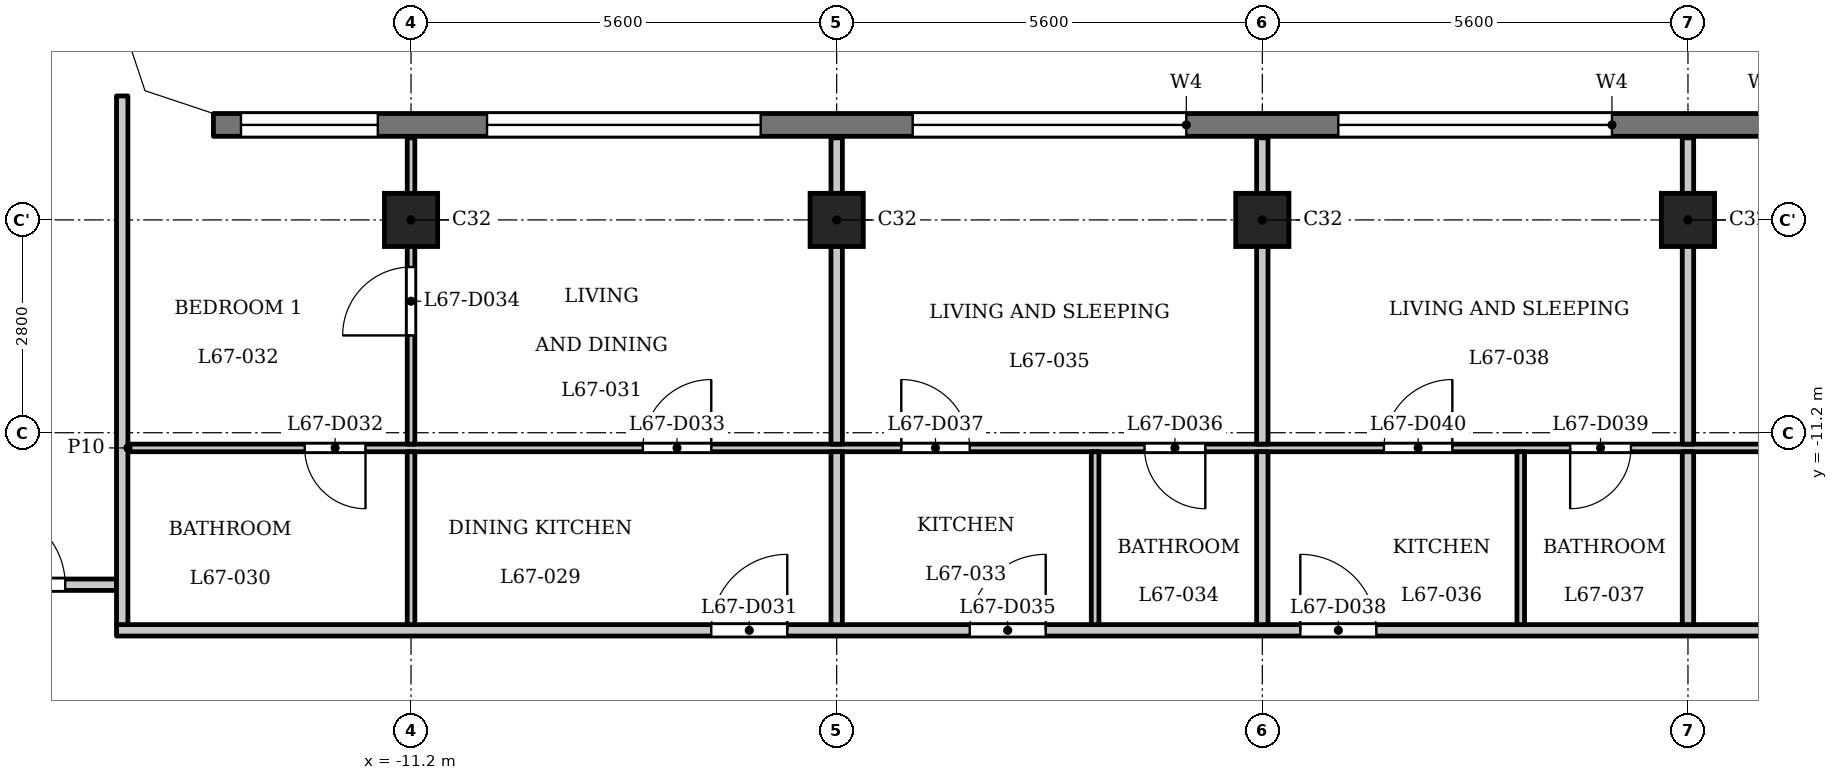
"""IFC4 building model, lengths in metres.
Left out: names, types, materials, properties, quantities, classifications, styles, units other than length and angle.
Written with IfcOpenShell. Run it as: python <this file> out.ifc"""

import sys

from ifc_helpers import new_model, si_unit, direction, frame, frame_2d, origin, origin_2d, place, context, subcontext, project, spatial, polyline, rectangle, outline, extrude, element, fill, save


model = new_model("IFC4")
c1 = context("Model", 3, precision=1e-05, world=origin(), true_north=direction((0.0, 1.0)))
c2 = subcontext(c1, "Body", "Model", "MODEL_VIEW")
j1 = project(units=[si_unit("LENGTHUNIT", "METRE"), si_unit("PLANEANGLEUNIT", "RADIAN")], contexts=[c1])
p1 = place(None, origin())
s1 = spatial("IfcSite", under=j1, at=p1, CompositionType="ELEMENT")
p2 = place(p1, origin())
s2 = spatial("IfcBuilding", under=s1, at=p2, CompositionType="ELEMENT")
p3 = place(p2, frame((0.0, 0.0, 259.2)))
s3 = spatial("IfcBuildingStorey", under=s2, at=p3, CompositionType="ELEMENT", Elevation=259.2)
for number, where, z_axis, x_axis in (
    (1, (-11.2, -8.4, 0.0), (0.0, 0.0, 1.0), (1.0, 0.0, 0.0)),
    (2, (-5.6, -8.4, 0.0), (0.0, 0.0, 1.0), (1.0, 0.0, 0.0)),
    (3, (0.0, -8.4, 0.0), (0.0, 0.0, 1.0), (1.0, 0.0, 0.0)),
    (4, (5.6, -8.4, 0.0), (0.0, 0.0, 1.0), (1.0, 0.0, 0.0)),
):
    element("IfcColumn", number, at=place(p3, frame(where, z_axis=z_axis, x_axis=x_axis)), inside=s3, PredefinedType="COLUMN", context=c2, shape_type="SweptSolid", body=[
        extrude(rectangle(XDim=0.7, YDim=0.7, at=origin_2d()), origin(), (0.0, 0.0, 1.0), 3.5),
    ])
p4 = place(p3, frame((13.8, -7.15, 0.0), z_axis=(0.0, 0.0, 1.0), x_axis=(-1.0, 0.0, 0.0)))
e5 = element("IfcWall", 5, at=p4, inside=s3, PredefinedType="SOLIDWALL", context=c2, shape_type="SweptSolid", body=[
    extrude(rectangle(XDim=27.6, YDim=0.3, at=frame_2d((13.8, 0.0))), origin(), (0.0, 0.0, 1.0), 3.2),
])
p5 = place(p4, frame((0.363, 0.0, 0.9)))
e6 = element("IfcOpeningElement", 6, at=p5, cuts=e5, PredefinedType="OPENING", context=c2, shape_type="SweptSolid", body=[
    extrude(rectangle(XDim=1.8, YDim=1.25, at=frame_2d((0.9, 0.625))), frame((0.0, 0.16, 0.0), z_axis=(0.0, -1.0, 0.0), x_axis=(1.0, 0.0, 0.0)), (0.0, 0.0, 1.0), 0.32),
])
p6 = place(p4, frame((3.6, 0.0, 1.2)))
e7 = element("IfcOpeningElement", 7, at=p6, cuts=e5, PredefinedType="OPENING", context=c2, shape_type="SweptSolid", body=[
    extrude(rectangle(XDim=3.6, YDim=0.95, at=frame_2d((1.8, 0.475))), frame((0.0, 0.16, 0.0), z_axis=(0.0, -1.0, 0.0), x_axis=(1.0, 0.0, 0.0)), (0.0, 0.0, 1.0), 0.32),
])
p7 = place(p4, frame((9.2, 0.0, 1.2)))
e8 = element("IfcOpeningElement", 8, at=p7, cuts=e5, PredefinedType="OPENING", context=c2, shape_type="SweptSolid", body=[
    extrude(rectangle(XDim=3.6, YDim=0.95, at=frame_2d((1.8, 0.475))), frame((0.0, 0.16, 0.0), z_axis=(0.0, -1.0, 0.0), x_axis=(1.0, 0.0, 0.0)), (0.0, 0.0, 1.0), 0.32),
])
p8 = place(p4, frame((14.8, 0.0, 1.2)))
e9 = element("IfcOpeningElement", 9, at=p8, cuts=e5, PredefinedType="OPENING", context=c2, shape_type="SweptSolid", body=[
    extrude(rectangle(XDim=3.6, YDim=0.95, at=frame_2d((1.8, 0.475))), frame((0.0, 0.16, 0.0), z_axis=(0.0, -1.0, 0.0), x_axis=(1.0, 0.0, 0.0)), (0.0, 0.0, 1.0), 0.32),
])
p9 = place(p4, frame((20.4, 0.0, 1.2)))
e10 = element("IfcOpeningElement", 10, at=p9, cuts=e5, PredefinedType="OPENING", context=c2, shape_type="SweptSolid", body=[
    extrude(rectangle(XDim=3.6, YDim=0.95, at=frame_2d((1.8, 0.475))), frame((0.0, 0.16, 0.0), z_axis=(0.0, -1.0, 0.0), x_axis=(1.0, 0.0, 0.0)), (0.0, 0.0, 1.0), 0.32),
])
p10 = place(p4, frame((25.438, 0.0, 0.9)))
e11 = element("IfcOpeningElement", 11, at=p10, cuts=e5, PredefinedType="OPENING", context=c2, shape_type="SweptSolid", body=[
    extrude(rectangle(XDim=1.8, YDim=1.25, at=frame_2d((0.9, 0.625))), frame((0.0, 0.16, 0.0), z_axis=(0.0, -1.0, 0.0), x_axis=(1.0, 0.0, 0.0)), (0.0, 0.0, 1.0), 0.32),
])
p11 = place(p3, frame((-15.075, -13.8, 0.0), z_axis=(0.0, 0.0, 1.0), x_axis=(1.0, 0.0, 0.0)))
e12 = element("IfcWall", 12, at=p11, inside=s3, PredefinedType="PARTITIONING", context=c2, shape_type="SweptSolid", body=[
    extrude(rectangle(XDim=30.15, YDim=0.15, at=frame_2d((15.075, 0.0))), origin(), (0.0, 0.0, 1.0), 3.2),
])
p12 = place(p11, frame((7.825, 0.0, 0.0)))
e13 = element("IfcOpeningElement", 13, at=p12, cuts=e12, PredefinedType="OPENING", context=c2, shape_type="SweptSolid", body=[
    extrude(rectangle(XDim=1.0, YDim=2.1, at=frame_2d((0.5, 1.05))), frame((0.0, 0.085, 0.0), z_axis=(0.0, -1.0, 0.0), x_axis=(1.0, 0.0, 0.0)), (0.0, 0.0, 1.0), 0.17),
])
p13 = place(p11, frame((11.225, 0.0, 0.0)))
e14 = element("IfcOpeningElement", 14, at=p13, cuts=e12, PredefinedType="OPENING", context=c2, shape_type="SweptSolid", body=[
    extrude(rectangle(XDim=1.0, YDim=2.1, at=frame_2d((0.5, 1.05))), frame((0.0, 0.085, 0.0), z_axis=(0.0, -1.0, 0.0), x_axis=(1.0, 0.0, 0.0)), (0.0, 0.0, 1.0), 0.17),
])
p14 = place(p11, frame((15.575, 0.0, 0.0)))
e15 = element("IfcOpeningElement", 15, at=p14, cuts=e12, PredefinedType="OPENING", context=c2, shape_type="SweptSolid", body=[
    extrude(rectangle(XDim=1.0, YDim=2.1, at=frame_2d((0.5, 1.05))), frame((0.0, 0.085, 0.0), z_axis=(0.0, -1.0, 0.0), x_axis=(1.0, 0.0, 0.0)), (0.0, 0.0, 1.0), 0.17),
])
p15 = place(p11, frame((28.424, 0.0, 0.0)))
e16 = element("IfcOpeningElement", 16, at=p15, cuts=e12, PredefinedType="OPENING", context=c2, shape_type="SweptSolid", body=[
    extrude(rectangle(XDim=1.0, YDim=2.1, at=frame_2d((0.5, 1.05))), frame((0.0, 0.085, 0.0), z_axis=(0.0, -1.0, 0.0), x_axis=(1.0, 0.0, 0.0)), (0.0, 0.0, 1.0), 0.17),
])
p16 = place(p3, frame((-17.4, -13.2, 0.0), z_axis=(0.0, 0.0, 1.0), x_axis=(1.0, 0.0, 0.0)))
e17 = element("IfcWall", 17, at=p16, inside=s3, PredefinedType="PARTITIONING", context=c2, shape_type="SweptSolid", body=[
    extrude(rectangle(XDim=2.325, YDim=0.15, at=frame_2d((1.163, 0.0))), origin(), (0.0, 0.0, 1.0), 3.2),
])
p17 = place(p16, frame((0.65, 0.0, 0.0)))
e18 = element("IfcOpeningElement", 18, at=p17, cuts=e17, PredefinedType="OPENING", context=c2, shape_type="SweptSolid", body=[
    extrude(rectangle(XDim=1.0, YDim=2.1, at=frame_2d((0.5, 1.05))), frame((0.0, 0.085, 0.0), z_axis=(0.0, -1.0, 0.0), x_axis=(1.0, 0.0, 0.0)), (0.0, 0.0, 1.0), 0.17),
])
p18 = place(p3, frame((-14.925, -11.4, 0.0), z_axis=(0.0, 0.0, 1.0), x_axis=(1.0, 0.0, 0.0)))
e19 = element("IfcWall", 19, at=p18, inside=s3, PredefinedType="PARTITIONING", context=c2, shape_type="SweptSolid", body=[
    extrude(rectangle(XDim=29.85, YDim=0.1, at=frame_2d((14.925, 0.0))), origin(), (0.0, 0.0, 1.0), 3.2),
])
p19 = place(p18, frame((2.326, 0.0, 0.0)))
e20 = element("IfcOpeningElement", 20, at=p19, cuts=e19, PredefinedType="OPENING", context=c2, shape_type="SweptSolid", body=[
    extrude(rectangle(XDim=0.8, YDim=2.1, at=frame_2d((0.4, 1.05))), frame((0.0, 0.06, 0.0), z_axis=(0.0, -1.0, 0.0), x_axis=(1.0, 0.0, 0.0)), (0.0, 0.0, 1.0), 0.12),
])
p20 = place(p18, frame((6.775, 0.0, 0.0)))
e21 = element("IfcOpeningElement", 21, at=p20, cuts=e19, PredefinedType="OPENING", context=c2, shape_type="SweptSolid", body=[
    extrude(rectangle(XDim=0.9, YDim=2.1, at=frame_2d((0.45, 1.05))), frame((0.0, 0.06, 0.0), z_axis=(0.0, -1.0, 0.0), x_axis=(1.0, 0.0, 0.0)), (0.0, 0.0, 1.0), 0.12),
])
p21 = place(p18, frame((13.375, 0.0, 0.0)))
e22 = element("IfcOpeningElement", 22, at=p21, cuts=e19, PredefinedType="OPENING", context=c2, shape_type="SweptSolid", body=[
    extrude(rectangle(XDim=0.8, YDim=2.1, at=frame_2d((0.4, 1.05))), frame((0.0, 0.06, 0.0), z_axis=(0.0, -1.0, 0.0), x_axis=(1.0, 0.0, 0.0)), (0.0, 0.0, 1.0), 0.12),
])
p22 = place(p18, frame((10.175, 0.0, 0.0)))
e23 = element("IfcOpeningElement", 23, at=p22, cuts=e19, PredefinedType="OPENING", context=c2, shape_type="SweptSolid", body=[
    extrude(rectangle(XDim=0.9, YDim=2.1, at=frame_2d((0.45, 1.05))), frame((0.0, 0.06, 0.0), z_axis=(0.0, -1.0, 0.0), x_axis=(1.0, 0.0, 0.0)), (0.0, 0.0, 1.0), 0.12),
])
p23 = place(p18, frame((18.975, 0.0, 0.0)))
e24 = element("IfcOpeningElement", 24, at=p23, cuts=e19, PredefinedType="OPENING", context=c2, shape_type="SweptSolid", body=[
    extrude(rectangle(XDim=0.8, YDim=2.1, at=frame_2d((0.4, 1.05))), frame((0.0, 0.06, 0.0), z_axis=(0.0, -1.0, 0.0), x_axis=(1.0, 0.0, 0.0)), (0.0, 0.0, 1.0), 0.12),
])
p24 = place(p18, frame((16.525, 0.0, 0.0)))
e25 = element("IfcOpeningElement", 25, at=p24, cuts=e19, PredefinedType="OPENING", context=c2, shape_type="SweptSolid", body=[
    extrude(rectangle(XDim=0.9, YDim=2.1, at=frame_2d((0.45, 1.05))), frame((0.0, 0.06, 0.0), z_axis=(0.0, -1.0, 0.0), x_axis=(1.0, 0.0, 0.0)), (0.0, 0.0, 1.0), 0.12),
])
p25 = place(p18, frame((24.675, 0.0, 0.0)))
e26 = element("IfcOpeningElement", 26, at=p25, cuts=e19, PredefinedType="OPENING", context=c2, shape_type="SweptSolid", body=[
    extrude(rectangle(XDim=0.8, YDim=2.1, at=frame_2d((0.4, 1.05))), frame((0.0, 0.06, 0.0), z_axis=(0.0, -1.0, 0.0), x_axis=(1.0, 0.0, 0.0)), (0.0, 0.0, 1.0), 0.12),
])
p26 = place(p18, frame((27.374, 0.0, 0.0)))
e27 = element("IfcOpeningElement", 27, at=p26, cuts=e19, PredefinedType="OPENING", context=c2, shape_type="SweptSolid", body=[
    extrude(rectangle(XDim=0.9, YDim=2.1, at=frame_2d((0.45, 1.05))), frame((0.0, 0.06, 0.0), z_axis=(0.0, -1.0, 0.0), x_axis=(1.0, 0.0, 0.0)), (0.0, 0.0, 1.0), 0.12),
])
p27 = place(p3, frame((-15.0, -13.725, 0.0), z_axis=(0.0, 0.0, 1.0), x_axis=(0.0, 1.0, 0.0)))
e28 = element("IfcWall", 28, at=p27, inside=s3, PredefinedType="PARTITIONING", context=c2, shape_type="SweptSolid", body=[
    extrude(rectangle(XDim=6.956, YDim=0.15, at=frame_2d((3.478, 0.0))), origin(), (0.0, 0.0, 1.0), 3.2),
])
p28 = place(p3, frame((-11.2, -13.725, 0.0), z_axis=(0.0, 0.0, 1.0), x_axis=(0.0, 1.0, 0.0)))
e29 = element("IfcWall", 29, at=p28, inside=s3, PredefinedType="PARTITIONING", context=c2, shape_type="SweptSolid", body=[
    extrude(rectangle(XDim=2.275, YDim=0.1, at=frame_2d((1.138, 0.0))), origin(), (0.0, 0.0, 1.0), 3.2),
])
p29 = place(p3, frame((-11.2, -11.35, 0.0), z_axis=(0.0, 0.0, 1.0), x_axis=(0.0, 1.0, 0.0)))
e30 = element("IfcWall", 30, at=p29, inside=s3, PredefinedType="PARTITIONING", context=c2, shape_type="SweptSolid", body=[
    extrude(rectangle(XDim=4.03, YDim=0.1, at=frame_2d((2.015, 0.0))), origin(), (0.0, 0.0, 1.0), 3.2),
])
p30 = place(p29, frame((1.43, 0.0, 0.0)))
e31 = element("IfcOpeningElement", 31, at=p30, cuts=e30, PredefinedType="OPENING", context=c2, shape_type="SweptSolid", body=[
    extrude(rectangle(XDim=0.9, YDim=2.1, at=frame_2d((0.45, 1.05))), frame((0.0, 0.06, 0.0), z_axis=(0.0, -1.0, 0.0), x_axis=(1.0, 0.0, 0.0)), (0.0, 0.0, 1.0), 0.12),
])
p31 = place(p3, frame((-5.6, -13.725, 0.0), z_axis=(0.0, 0.0, 1.0), x_axis=(0.0, 1.0, 0.0)))
e32 = element("IfcWall", 32, at=p31, inside=s3, PredefinedType="PARTITIONING", context=c2, shape_type="SweptSolid", body=[
    extrude(rectangle(XDim=2.275, YDim=0.15, at=frame_2d((1.138, 0.0))), origin(), (0.0, 0.0, 1.0), 3.2),
])
p32 = place(p3, frame((-5.6, -11.35, 0.0), z_axis=(0.0, 0.0, 1.0), x_axis=(0.0, 1.0, 0.0)))
e33 = element("IfcWall", 33, at=p32, inside=s3, PredefinedType="PARTITIONING", context=c2, shape_type="SweptSolid", body=[
    extrude(rectangle(XDim=4.03, YDim=0.15, at=frame_2d((2.015, 0.0))), origin(), (0.0, 0.0, 1.0), 3.2),
])
p33 = place(p3, frame((-2.2, -13.725, 0.0), z_axis=(0.0, 0.0, 1.0), x_axis=(0.0, 1.0, 0.0)))
e34 = element("IfcWall", 34, at=p33, inside=s3, PredefinedType="PARTITIONING", context=c2, shape_type="SweptSolid", body=[
    extrude(rectangle(XDim=2.275, YDim=0.1, at=frame_2d((1.138, 0.0))), origin(), (0.0, 0.0, 1.0), 3.2),
])
p34 = place(p3, frame((0.0, -13.725, 0.0), z_axis=(0.0, 0.0, 1.0), x_axis=(0.0, 1.0, 0.0)))
e35 = element("IfcWall", 35, at=p34, inside=s3, PredefinedType="PARTITIONING", context=c2, shape_type="SweptSolid", body=[
    extrude(rectangle(XDim=2.275, YDim=0.15, at=frame_2d((1.138, 0.0))), origin(), (0.0, 0.0, 1.0), 3.2),
])
p35 = place(p3, frame((0.0, -11.35, 0.0), z_axis=(0.0, 0.0, 1.0), x_axis=(0.0, 1.0, 0.0)))
e36 = element("IfcWall", 36, at=p35, inside=s3, PredefinedType="PARTITIONING", context=c2, shape_type="SweptSolid", body=[
    extrude(rectangle(XDim=4.03, YDim=0.15, at=frame_2d((2.015, 0.0))), origin(), (0.0, 0.0, 1.0), 3.2),
])
p36 = place(p3, frame((3.4, -13.725, 0.0), z_axis=(0.0, 0.0, 1.0), x_axis=(0.0, 1.0, 0.0)))
e37 = element("IfcWall", 37, at=p36, inside=s3, PredefinedType="PARTITIONING", context=c2, shape_type="SweptSolid", body=[
    extrude(rectangle(XDim=2.275, YDim=0.1, at=frame_2d((1.138, 0.0))), origin(), (0.0, 0.0, 1.0), 3.2),
])
p37 = place(p3, frame((5.6, -13.725, 0.0), z_axis=(0.0, 0.0, 1.0), x_axis=(0.0, 1.0, 0.0)))
e38 = element("IfcWall", 38, at=p37, inside=s3, PredefinedType="PARTITIONING", context=c2, shape_type="SweptSolid", body=[
    extrude(rectangle(XDim=2.275, YDim=0.15, at=frame_2d((1.138, 0.0))), origin(), (0.0, 0.0, 1.0), 3.2),
])
p38 = place(p3, frame((5.6, -11.35, 0.0), z_axis=(0.0, 0.0, 1.0), x_axis=(0.0, 1.0, 0.0)))
e39 = element("IfcWall", 39, at=p38, inside=s3, PredefinedType="PARTITIONING", context=c2, shape_type="SweptSolid", body=[
    extrude(rectangle(XDim=4.03, YDim=0.15, at=frame_2d((2.015, 0.0))), origin(), (0.0, 0.0, 1.0), 3.2),
])
p39 = place(p3, origin())
e40 = element("IfcWall", 40, at=p39, inside=s3, PredefinedType="SOLIDWALL", context=c2, shape_type="SweptSolid", body=[
    extrude(outline(polyline([(-14.937, -6.937), (-13.849, -7.3), (-13.8, -7.3), (-13.8, -7.0), (-14.7, -6.7), (-15.0, -5.8), (-15.3, -5.8), (-15.3, -5.849), (-14.937, -6.937)])), origin(), (0.0, 0.0, 1.0), 3.2),
])
p40 = place(p17, origin())
e41 = element("IfcDoor", 41, at=p40, inside=s3, OperationType="SINGLE_SWING_RIGHT", PredefinedType="DOOR", context=c2, shape_type="SweptSolid", body=[
    extrude(rectangle(XDim=1.0, YDim=2.1, at=frame_2d((0.5, 1.05))), frame((0.0, 0.025, 0.0), z_axis=(0.0, -1.0, 0.0), x_axis=(1.0, 0.0, 0.0)), (0.0, 0.0, 1.0), 0.05),
])
fill(e18, e41)
p41 = place(p12, origin())
e42 = element("IfcDoor", 42, at=p41, inside=s3, OperationType="SINGLE_SWING_LEFT", PredefinedType="DOOR", context=c2, shape_type="SweptSolid", body=[
    extrude(rectangle(XDim=1.0, YDim=2.1, at=frame_2d((0.5, 1.05))), frame((0.0, 0.025, 0.0), z_axis=(0.0, -1.0, 0.0), x_axis=(1.0, 0.0, 0.0)), (0.0, 0.0, 1.0), 0.05),
])
fill(e13, e42)
p42 = place(p19, origin())
e43 = element("IfcDoor", 43, at=p42, inside=s3, OperationType="SINGLE_SWING_RIGHT", PredefinedType="DOOR", context=c2, shape_type="SweptSolid", body=[
    extrude(rectangle(XDim=0.8, YDim=2.1, at=frame_2d((0.4, 1.05))), frame((0.0, 0.025, 0.0), z_axis=(0.0, -1.0, 0.0), x_axis=(1.0, 0.0, 0.0)), (0.0, 0.0, 1.0), 0.05),
])
fill(e20, e43)
p43 = place(p20, origin())
e44 = element("IfcDoor", 44, at=p43, inside=s3, OperationType="SINGLE_SWING_LEFT", PredefinedType="DOOR", context=c2, shape_type="SweptSolid", body=[
    extrude(rectangle(XDim=0.9, YDim=2.1, at=frame_2d((0.45, 1.05))), frame((0.0, 0.025, 0.0), z_axis=(0.0, -1.0, 0.0), x_axis=(1.0, 0.0, 0.0)), (0.0, 0.0, 1.0), 0.05),
])
fill(e21, e44)
p44 = place(p30, origin())
e45 = element("IfcDoor", 45, at=p44, inside=s3, OperationType="SINGLE_SWING_RIGHT", PredefinedType="DOOR", context=c2, shape_type="SweptSolid", body=[
    extrude(rectangle(XDim=0.9, YDim=2.1, at=frame_2d((0.45, 1.05))), frame((0.0, 0.025, 0.0), z_axis=(0.0, -1.0, 0.0), x_axis=(1.0, 0.0, 0.0)), (0.0, 0.0, 1.0), 0.05),
])
fill(e31, e45)
p45 = place(p13, origin())
e46 = element("IfcDoor", 46, at=p45, inside=s3, OperationType="SINGLE_SWING_LEFT", PredefinedType="DOOR", context=c2, shape_type="SweptSolid", body=[
    extrude(rectangle(XDim=1.0, YDim=2.1, at=frame_2d((0.5, 1.05))), frame((0.0, 0.025, 0.0), z_axis=(0.0, -1.0, 0.0), x_axis=(1.0, 0.0, 0.0)), (0.0, 0.0, 1.0), 0.05),
])
fill(e14, e46)
p46 = place(p21, origin())
e47 = element("IfcDoor", 47, at=p46, inside=s3, OperationType="SINGLE_SWING_RIGHT", PredefinedType="DOOR", context=c2, shape_type="SweptSolid", body=[
    extrude(rectangle(XDim=0.8, YDim=2.1, at=frame_2d((0.4, 1.05))), frame((0.0, 0.025, 0.0), z_axis=(0.0, -1.0, 0.0), x_axis=(1.0, 0.0, 0.0)), (0.0, 0.0, 1.0), 0.05),
])
fill(e22, e47)
p47 = place(p22, origin())
e48 = element("IfcDoor", 48, at=p47, inside=s3, OperationType="SINGLE_SWING_RIGHT", PredefinedType="DOOR", context=c2, shape_type="SweptSolid", body=[
    extrude(rectangle(XDim=0.9, YDim=2.1, at=frame_2d((0.45, 1.05))), frame((0.0, 0.025, 0.0), z_axis=(0.0, -1.0, 0.0), x_axis=(1.0, 0.0, 0.0)), (0.0, 0.0, 1.0), 0.05),
])
fill(e23, e48)
p48 = place(p14, origin())
e49 = element("IfcDoor", 49, at=p48, inside=s3, OperationType="SINGLE_SWING_RIGHT", PredefinedType="DOOR", context=c2, shape_type="SweptSolid", body=[
    extrude(rectangle(XDim=1.0, YDim=2.1, at=frame_2d((0.5, 1.05))), frame((0.0, 0.025, 0.0), z_axis=(0.0, -1.0, 0.0), x_axis=(1.0, 0.0, 0.0)), (0.0, 0.0, 1.0), 0.05),
])
fill(e15, e49)
p49 = place(p23, origin())
e50 = element("IfcDoor", 50, at=p49, inside=s3, OperationType="SINGLE_SWING_LEFT", PredefinedType="DOOR", context=c2, shape_type="SweptSolid", body=[
    extrude(rectangle(XDim=0.8, YDim=2.1, at=frame_2d((0.4, 1.05))), frame((0.0, 0.025, 0.0), z_axis=(0.0, -1.0, 0.0), x_axis=(1.0, 0.0, 0.0)), (0.0, 0.0, 1.0), 0.05),
])
fill(e24, e50)
p50 = place(p24, origin())
e51 = element("IfcDoor", 51, at=p50, inside=s3, OperationType="SINGLE_SWING_LEFT", PredefinedType="DOOR", context=c2, shape_type="SweptSolid", body=[
    extrude(rectangle(XDim=0.9, YDim=2.1, at=frame_2d((0.45, 1.05))), frame((0.0, 0.025, 0.0), z_axis=(0.0, -1.0, 0.0), x_axis=(1.0, 0.0, 0.0)), (0.0, 0.0, 1.0), 0.05),
])
fill(e25, e51)
p51 = place(p7, origin())
e52 = element("IfcWindow", 52, at=p51, inside=s3, PartitioningType="SINGLE_PANEL", PredefinedType="WINDOW", context=c2, shape_type="SweptSolid", body=[
    extrude(rectangle(XDim=3.6, YDim=0.95, at=frame_2d((1.8, 0.475))), frame((0.0, 0.03, 0.0), z_axis=(0.0, -1.0, 0.0), x_axis=(1.0, 0.0, 0.0)), (0.0, 0.0, 1.0), 0.06),
])
fill(e8, e52)
p52 = place(p8, origin())
e53 = element("IfcWindow", 53, at=p52, inside=s3, PartitioningType="SINGLE_PANEL", PredefinedType="WINDOW", context=c2, shape_type="SweptSolid", body=[
    extrude(rectangle(XDim=3.6, YDim=0.95, at=frame_2d((1.8, 0.475))), frame((0.0, 0.03, 0.0), z_axis=(0.0, -1.0, 0.0), x_axis=(1.0, 0.0, 0.0)), (0.0, 0.0, 1.0), 0.06),
])
fill(e9, e53)
p53 = place(p9, origin())
e54 = element("IfcWindow", 54, at=p53, inside=s3, PartitioningType="SINGLE_PANEL", PredefinedType="WINDOW", context=c2, shape_type="SweptSolid", body=[
    extrude(rectangle(XDim=3.6, YDim=0.95, at=frame_2d((1.8, 0.475))), frame((0.0, 0.03, 0.0), z_axis=(0.0, -1.0, 0.0), x_axis=(1.0, 0.0, 0.0)), (0.0, 0.0, 1.0), 0.06),
])
fill(e10, e54)
p54 = place(p10, origin())
e55 = element("IfcWindow", 55, at=p54, inside=s3, PartitioningType="SINGLE_PANEL", PredefinedType="WINDOW", context=c2, shape_type="SweptSolid", body=[
    extrude(rectangle(XDim=1.8, YDim=1.25, at=frame_2d((0.9, 0.625))), frame((0.0, 0.03, 0.0), z_axis=(0.0, -1.0, 0.0), x_axis=(1.0, 0.0, 0.0)), (0.0, 0.0, 1.0), 0.06),
])
fill(e11, e55)
save(model, sys.argv[1])
